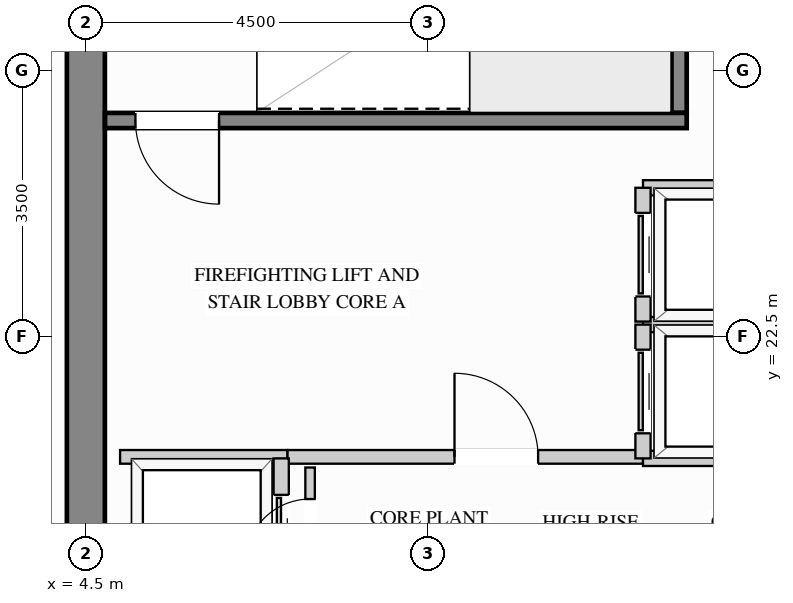
"""IFC4 building model, lengths in metres.
Left out: names, types, materials, properties, quantities, classifications, styles, units other than length and angle.
Written with IfcOpenShell. Run it as: python <this file> out.ifc"""

import sys

from ifc_helpers import new_model, si_unit, direction, frame, frame_2d, origin, place, context, subcontext, project, spatial, rectangle, extrude, source, transform, mapped, element, fill, save


model = new_model("IFC4")
c1 = context("Model", 3, precision=1e-05, world=origin(), true_north=direction((0.0, 1.0)))
c2 = subcontext(c1, "Body", "Model", "MODEL_VIEW")
j1 = project(units=[si_unit("LENGTHUNIT", "METRE"), si_unit("PLANEANGLEUNIT", "RADIAN")], contexts=[c1])
p1 = place(None, origin())
s1 = spatial("IfcSite", under=j1, at=p1, CompositionType="ELEMENT")
p2 = place(p1, origin())
s2 = spatial("IfcBuilding", under=s1, at=p2, CompositionType="ELEMENT")
p3 = place(p2, frame((0.0, 0.0, 219.6)))
s3 = spatial("IfcBuildingStorey", under=s2, at=p3, CompositionType="ELEMENT", Elevation=219.6)
m1 = source(origin(), c2, "Body", "SweptSolid", [
    extrude(rectangle(XDim=20.5, YDim=0.5, at=frame_2d((10.25, 0.0))), origin(), (0.0, 0.0, 1.0), 3.4),
])
p4 = place(p3, frame((4.5, 8.75, 0.0), z_axis=(0.0, 0.0, 1.0), x_axis=(0.0, 1.0, 0.0)))
e1 = element("IfcWall", 1, at=p4, inside=s3, PredefinedType="SHEAR", context=c2, shape_type="MappedRepresentation", body=[
    mapped(m1, transform((0.0, 0.0, 0.0), x_axis=(1.0, 0.0, 0.0), y_axis=(0.0, 1.0, 0.0), z_axis=(0.0, 0.0, 1.0))),
])
p5 = place(p3, frame((7.15, 20.92, 0.0), z_axis=(0.0, 0.0, 1.0), x_axis=(1.0, 0.0, 0.0)))
e2 = element("IfcWall", 2, at=p5, inside=s3, PredefinedType="PARTITIONING", context=c2, shape_type="SweptSolid", body=[
    extrude(rectangle(XDim=4.68, YDim=0.18, at=frame_2d((2.34, 0.0))), origin(), (0.0, 0.0, 1.0), 3.385),
])
p6 = place(p5, frame((2.2, 0.0, 0.0)))
e3 = element("IfcOpeningElement", 3, at=p6, cuts=e2, PredefinedType="OPENING", context=c2, shape_type="SweptSolid", body=[
    extrude(rectangle(XDim=1.1, YDim=2.15, at=frame_2d((0.55, 1.075))), frame((0.0, 0.1, 0.0), z_axis=(0.0, -1.0, 0.0), x_axis=(1.0, 0.0, 0.0)), (0.0, 0.0, 1.0), 0.2),
])
m2 = source(origin(), c2, "Body", "SweptSolid", [
    extrude(rectangle(XDim=2.2, YDim=0.18, at=frame_2d((1.1, 0.0))), origin(), (0.0, 0.0, 1.0), 3.385),
])
p7 = place(p3, frame((4.95, 20.92, 0.0), z_axis=(0.0, 0.0, 1.0), x_axis=(1.0, 0.0, 0.0)))
e4 = element("IfcWall", 4, at=p7, inside=s3, PredefinedType="PARTITIONING", context=c2, shape_type="MappedRepresentation", body=[
    mapped(m2, transform((0.0, 0.0, 0.0), x_axis=(1.0, 0.0, 0.0), y_axis=(0.0, 1.0, 0.0), z_axis=(0.0, 0.0, 1.0))),
])
p8 = place(p3, frame((7.45, 19.2, 0.0), z_axis=(0.0, 0.0, 1.0), x_axis=(0.0, 1.0, 0.0)))
e5 = element("IfcWall", 5, at=p8, inside=s3, PredefinedType="PARTITIONING", context=c2, shape_type="SweptSolid", body=[
    extrude(rectangle(XDim=1.58, YDim=0.125, at=frame_2d((0.79, 0.0))), origin(), (0.0, 0.0, 1.0), 3.385),
])
p9 = place(p8, frame((0.315, 0.0, 0.0)))
e6 = element("IfcOpeningElement", 6, at=p9, cuts=e5, PredefinedType="OPENING", context=c2, shape_type="SweptSolid", body=[
    extrude(rectangle(XDim=0.85, YDim=2.1, at=frame_2d((0.425, 1.05))), frame((0.0, 0.073, 0.0), z_axis=(0.0, -1.0, 0.0), x_axis=(1.0, 0.0, 0.0)), (0.0, 0.0, 1.0), 0.145),
])
m3 = source(origin(), c2, "Body", "SweptSolid", [
    extrude(rectangle(XDim=2.39, YDim=0.2, at=frame_2d((1.195, 0.0))), origin(), (0.0, 0.0, 1.0), 3.385),
])
for number, where, z_axis, x_axis in (
    (7, (11.83, 22.66, 0.0), (0.0, 0.0, 1.0), (1.0, 0.0, 0.0)),
    (8, (11.83, 20.9, 0.0), (0.0, 0.0, 1.0), (1.0, 0.0, 0.0)),
):
    element("IfcWall", number, at=place(p3, frame(where, z_axis=z_axis, x_axis=x_axis)), inside=s3, PredefinedType="PARTITIONING", context=c2, shape_type="MappedRepresentation", body=[
        mapped(m3, transform((0.0, 0.0, 0.0), x_axis=(1.0, 0.0, 0.0), y_axis=(0.0, 1.0, 0.0), z_axis=(0.0, 0.0, 1.0))),
    ])
p10 = place(p3, frame((11.83, 20.9, 0.0), z_axis=(0.0, 0.0, 1.0), x_axis=(0.0, 1.0, 0.0)))
e9 = element("IfcWall", 9, at=p10, inside=s3, PredefinedType="PARTITIONING", context=c2, shape_type="SweptSolid", body=[
    extrude(rectangle(XDim=1.76, YDim=0.2, at=frame_2d((0.88, 0.0))), origin(), (0.0, 0.0, 1.0), 3.385),
])
p11 = place(p10, frame((0.33, 0.0, 0.0)))
e10 = element("IfcOpeningElement", 10, at=p11, cuts=e9, PredefinedType="OPENING", context=c2, shape_type="SweptSolid", body=[
    extrude(rectangle(XDim=1.1, YDim=2.2, at=frame_2d((0.55, 1.1))), frame((0.0, 0.11, 0.0), z_axis=(0.0, -1.0, 0.0), x_axis=(1.0, 0.0, 0.0)), (0.0, 0.0, 1.0), 0.22),
])
p12 = place(p3, frame((11.83, 24.46, 0.0), z_axis=(0.0, 0.0, 1.0), x_axis=(1.0, 0.0, 0.0)))
e11 = element("IfcWall", 11, at=p12, inside=s3, PredefinedType="PARTITIONING", context=c2, shape_type="MappedRepresentation", body=[
    mapped(m3, transform((0.0, 0.0, 0.0), x_axis=(1.0, 0.0, 0.0), y_axis=(0.0, 1.0, 0.0), z_axis=(0.0, 0.0, 1.0))),
])
p13 = place(p3, frame((11.83, 22.7, 0.0), z_axis=(0.0, 0.0, 1.0), x_axis=(0.0, 1.0, 0.0)))
e12 = element("IfcWall", 12, at=p13, inside=s3, PredefinedType="PARTITIONING", context=c2, shape_type="SweptSolid", body=[
    extrude(rectangle(XDim=1.76, YDim=0.2, at=frame_2d((0.88, 0.0))), origin(), (0.0, 0.0, 1.0), 3.385),
])
p14 = place(p13, frame((0.33, 0.0, 0.0)))
e13 = element("IfcOpeningElement", 13, at=p14, cuts=e12, PredefinedType="OPENING", context=c2, shape_type="SweptSolid", body=[
    extrude(rectangle(XDim=1.1, YDim=2.2, at=frame_2d((0.55, 1.1))), frame((0.0, 0.11, 0.0), z_axis=(0.0, -1.0, 0.0), x_axis=(1.0, 0.0, 0.0)), (0.0, 0.0, 1.0), 0.22),
])
p15 = place(p3, frame((7.07, 18.84, 0.0), z_axis=(0.0, 0.0, 1.0), x_axis=(0.0, 1.0, 0.0)))
e14 = element("IfcWall", 14, at=p15, inside=s3, PredefinedType="PARTITIONING", context=c2, shape_type="SweptSolid", body=[
    extrude(rectangle(XDim=2.06, YDim=0.2, at=frame_2d((1.03, 0.0))), origin(), (0.0, 0.0, 1.0), 3.385),
])
p16 = place(p15, frame((0.48, 0.0, 0.0)))
e15 = element("IfcOpeningElement", 15, at=p16, cuts=e14, PredefinedType="OPENING", context=c2, shape_type="SweptSolid", body=[
    extrude(rectangle(XDim=1.1, YDim=2.2, at=frame_2d((0.55, 1.1))), frame((0.0, 0.11, 0.0), z_axis=(0.0, -1.0, 0.0), x_axis=(1.0, 0.0, 0.0)), (0.0, 0.0, 1.0), 0.22),
])
m4 = source(origin(), c2, "Body", "SweptSolid", [
    extrude(rectangle(XDim=3.803, YDim=0.2, at=frame_2d((1.901, 0.0))), origin(), (0.0, 0.0, 1.0), 3.4),
])
p17 = place(p3, frame((12.305, 25.445, 0.0), z_axis=(0.0, 0.0, 1.0), x_axis=(0.0, 1.0, 0.0)))
e16 = element("IfcWall", 16, at=p17, inside=s3, PredefinedType="SHEAR", context=c2, shape_type="MappedRepresentation", body=[
    mapped(m4, transform((0.0, 0.0, 0.0), x_axis=(1.0, 0.0, 0.0), y_axis=(0.0, 1.0, 0.0), z_axis=(0.0, 0.0, 1.0))),
])
p18 = place(p3, frame((4.752, 25.345, 0.0), z_axis=(0.0, 0.0, 1.0), x_axis=(1.0, 0.0, 0.0)))
e17 = element("IfcWall", 17, at=p18, inside=s3, PredefinedType="SHEAR", context=c2, shape_type="SweptSolid", body=[
    extrude(rectangle(XDim=7.653, YDim=0.2, at=frame_2d((3.827, 0.0))), origin(), (0.0, 0.0, 1.0), 3.4),
])
p19 = place(p18, frame((0.4, 0.0, 0.0)))
e18 = element("IfcOpeningElement", 18, at=p19, cuts=e17, PredefinedType="OPENING", context=c2, shape_type="SweptSolid", body=[
    extrude(rectangle(XDim=1.1, YDim=2.15, at=frame_2d((0.55, 1.075))), frame((0.0, 0.11, 0.0), z_axis=(0.0, -1.0, 0.0), x_axis=(1.0, 0.0, 0.0)), (0.0, 0.0, 1.0), 0.22),
])
m5 = source(origin(), c2, "Body", "SweptSolid", [
    extrude(rectangle(XDim=1.1, YDim=2.15, at=frame_2d((0.55, 1.075))), frame((0.0, 0.025, 0.0), z_axis=(0.0, -1.0, 0.0), x_axis=(1.0, 0.0, 0.0)), (0.0, 0.0, 1.0), 0.05),
])
p20 = place(p6, origin())
e19 = element("IfcDoor", 19, at=p20, inside=s3, OperationType="SINGLE_SWING_LEFT", PredefinedType="DOOR", context=c2, shape_type="MappedRepresentation", body=[
    mapped(m5, transform((0.0, 0.0, 0.0), x_axis=(1.0, 0.0, 0.0), y_axis=(0.0, 1.0, 0.0), z_axis=(0.0, 0.0, 1.0))),
])
fill(e3, e19)
m6 = source(origin(), c2, "Body", "SweptSolid", [
    extrude(rectangle(XDim=1.1, YDim=2.2, at=frame_2d((0.55, 1.1))), frame((0.0, 0.025, 0.0), z_axis=(0.0, -1.0, 0.0), x_axis=(1.0, 0.0, 0.0)), (0.0, 0.0, 1.0), 0.05),
])
p21 = place(p11, origin())
e20 = element("IfcDoor", 20, at=p21, inside=s3, OperationType="SLIDING_TO_LEFT", PredefinedType="DOOR", context=c2, shape_type="MappedRepresentation", body=[
    mapped(m6, transform((0.0, 0.0, 0.0), x_axis=(1.0, 0.0, 0.0), y_axis=(0.0, 1.0, 0.0), z_axis=(0.0, 0.0, 1.0))),
])
fill(e10, e20)
p22 = place(p14, origin())
e21 = element("IfcDoor", 21, at=p22, inside=s3, OperationType="SLIDING_TO_LEFT", PredefinedType="DOOR", context=c2, shape_type="MappedRepresentation", body=[
    mapped(m6, transform((0.0, 0.0, 0.0), x_axis=(1.0, 0.0, 0.0), y_axis=(0.0, 1.0, 0.0), z_axis=(0.0, 0.0, 1.0))),
])
fill(e13, e21)
p23 = place(p16, origin())
e22 = element("IfcDoor", 22, at=p23, inside=s3, OperationType="SLIDING_TO_LEFT", PredefinedType="DOOR", context=c2, shape_type="MappedRepresentation", body=[
    mapped(m6, transform((0.0, 0.0, 0.0), x_axis=(1.0, 0.0, 0.0), y_axis=(0.0, 1.0, 0.0), z_axis=(0.0, 0.0, 1.0))),
])
fill(e15, e22)
m7 = source(origin(), c2, "Body", "SweptSolid", [
    extrude(rectangle(XDim=0.85, YDim=2.1, at=frame_2d((0.425, 1.05))), frame((0.0, 0.025, 0.0), z_axis=(0.0, -1.0, 0.0), x_axis=(1.0, 0.0, 0.0)), (0.0, 0.0, 1.0), 0.05),
])
p24 = place(p9, origin())
e23 = element("IfcDoor", 23, at=p24, inside=s3, OperationType="SINGLE_SWING_LEFT", PredefinedType="DOOR", context=c2, shape_type="MappedRepresentation", body=[
    mapped(m7, transform((0.0, 0.0, 0.0), x_axis=(1.0, 0.0, 0.0), y_axis=(0.0, 1.0, 0.0), z_axis=(0.0, 0.0, 1.0))),
])
fill(e6, e23)
m8 = source(origin(), c2, "Body", "SweptSolid", [
    extrude(rectangle(XDim=1.1, YDim=2.15, at=frame_2d((0.55, 1.075))), frame((0.0, 0.025, 0.0), z_axis=(0.0, -1.0, 0.0), x_axis=(1.0, 0.0, 0.0)), (0.0, 0.0, 1.0), 0.05),
])
p25 = place(p19, origin())
e24 = element("IfcDoor", 24, at=p25, inside=s3, OperationType="SINGLE_SWING_RIGHT", PredefinedType="DOOR", context=c2, shape_type="MappedRepresentation", body=[
    mapped(m8, transform((0.0, 0.0, 0.0), x_axis=(1.0, 0.0, 0.0), y_axis=(0.0, 1.0, 0.0), z_axis=(0.0, 0.0, 1.0))),
])
fill(e18, e24)
save(model, sys.argv[1])
